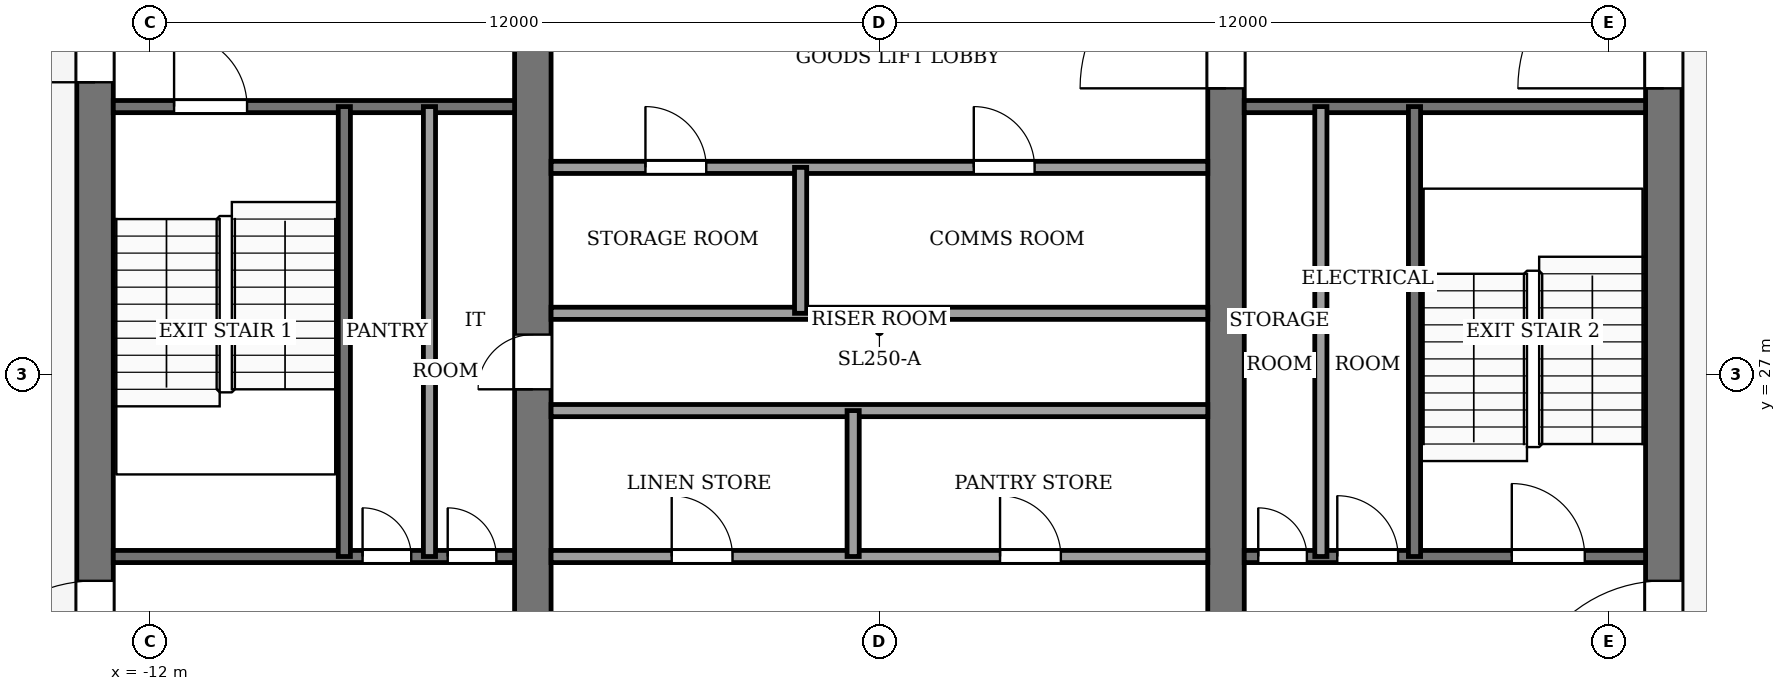
"""IFC4 building model, lengths in metres.
Left out: names, types, materials, properties, quantities, classifications, styles, units other than length and angle.
Written with IfcOpenShell. Run it as: python <this file> out.ifc"""

import sys

from ifc_helpers import new_model, si_unit, direction, frame, frame_2d, origin, place, context, subcontext, project, spatial, rectangle, extrude, element, fill, save


model = new_model("IFC4")
c1 = context("Model", 3, precision=1e-05, world=origin(), true_north=direction((0.0, 1.0)))
c2 = subcontext(c1, "Body", "Model", "MODEL_VIEW")
j1 = project(units=[si_unit("LENGTHUNIT", "METRE"), si_unit("PLANEANGLEUNIT", "RADIAN")], contexts=[c1])
p1 = place(None, origin())
s1 = spatial("IfcSite", under=j1, at=p1, CompositionType="ELEMENT")
p2 = place(p1, origin())
s2 = spatial("IfcBuilding", under=s1, at=p2, CompositionType="ELEMENT")
p3 = place(p2, frame((0.0, 0.0, 326.0)))
s3 = spatial("IfcBuildingStorey", under=s2, at=p3, CompositionType="ELEMENT", Elevation=326.0)
p4 = place(p3, frame((-12.9, 18.4, -0.13), z_axis=(0.0, 0.0, 1.0), x_axis=(0.0, 1.0, 0.0)))
e1 = element("IfcWall", 1, at=p4, inside=s3, PredefinedType="SHEAR", context=c2, shape_type="SweptSolid", body=[
    extrude(rectangle(XDim=19.2, YDim=0.6, at=frame_2d((9.6, 0.0))), origin(), (0.0, 0.0, 1.0), 4.0),
])
p5 = place(p4, frame((2.8, 0.0, 0.13)))
e2 = element("IfcOpeningElement", 2, at=p5, cuts=e1, PredefinedType="OPENING", context=c2, shape_type="SweptSolid", body=[
    extrude(rectangle(XDim=2.4, YDim=2.4, at=frame_2d((1.2, 1.2))), frame((0.0, 0.31, 0.0), z_axis=(0.0, -1.0, 0.0), x_axis=(1.0, 0.0, 0.0)), (0.0, 0.0, 1.0), 0.62),
])
p6 = place(p4, frame((13.4, 0.0, 0.13)))
e3 = element("IfcOpeningElement", 3, at=p6, cuts=e1, PredefinedType="OPENING", context=c2, shape_type="SweptSolid", body=[
    extrude(rectangle(XDim=1.4, YDim=2.2, at=frame_2d((0.7, 1.1))), frame((0.0, 0.31, 0.0), z_axis=(0.0, -1.0, 0.0), x_axis=(1.0, 0.0, 0.0)), (0.0, 0.0, 1.0), 0.62),
])
p7 = place(p3, frame((12.9, 18.4, -0.13), z_axis=(0.0, 0.0, 1.0), x_axis=(0.0, 1.0, 0.0)))
e4 = element("IfcWall", 4, at=p7, inside=s3, PredefinedType="SHEAR", context=c2, shape_type="SweptSolid", body=[
    extrude(rectangle(XDim=19.2, YDim=0.6, at=frame_2d((9.6, 0.0))), origin(), (0.0, 0.0, 1.0), 4.0),
])
p8 = place(p7, frame((2.8, 0.0, 0.13)))
e5 = element("IfcOpeningElement", 5, at=p8, cuts=e4, PredefinedType="OPENING", context=c2, shape_type="SweptSolid", body=[
    extrude(rectangle(XDim=2.4, YDim=2.4, at=frame_2d((1.2, 1.2))), frame((0.0, 0.31, 0.0), z_axis=(0.0, -1.0, 0.0), x_axis=(1.0, 0.0, 0.0)), (0.0, 0.0, 1.0), 0.62),
])
p9 = place(p7, frame((13.3, 0.0, 0.13)))
e6 = element("IfcOpeningElement", 6, at=p9, cuts=e4, PredefinedType="OPENING", context=c2, shape_type="SweptSolid", body=[
    extrude(rectangle(XDim=2.4, YDim=2.4, at=frame_2d((1.2, 1.2))), frame((0.0, 0.31, 0.0), z_axis=(0.0, -1.0, 0.0), x_axis=(1.0, 0.0, 0.0)), (0.0, 0.0, 1.0), 0.62),
])
p10 = place(p3, frame((-5.7, 18.4, -0.13), z_axis=(0.0, 0.0, 1.0), x_axis=(0.0, 1.0, 0.0)))
e7 = element("IfcWall", 7, at=p10, inside=s3, PredefinedType="SHEAR", context=c2, shape_type="SweptSolid", body=[
    extrude(rectangle(XDim=19.2, YDim=0.6, at=frame_2d((9.6, 0.0))), origin(), (0.0, 0.0, 1.0), 4.0),
])
p11 = place(p10, frame((8.35, 0.0, 0.13)))
e8 = element("IfcOpeningElement", 8, at=p11, cuts=e7, PredefinedType="OPENING", context=c2, shape_type="SweptSolid", body=[
    extrude(rectangle(XDim=0.9, YDim=2.1, at=frame_2d((0.45, 1.05))), frame((0.0, 0.31, 0.0), z_axis=(0.0, -1.0, 0.0), x_axis=(1.0, 0.0, 0.0)), (0.0, 0.0, 1.0), 0.62),
])
p12 = place(p3, frame((5.7, 18.4, -0.13), z_axis=(0.0, 0.0, 1.0), x_axis=(0.0, 1.0, 0.0)))
e9 = element("IfcWall", 9, at=p12, inside=s3, PredefinedType="SHEAR", context=c2, shape_type="SweptSolid", body=[
    extrude(rectangle(XDim=19.2, YDim=0.6, at=frame_2d((9.6, 0.0))), origin(), (0.0, 0.0, 1.0), 4.0),
])
p13 = place(p12, frame((13.3, 0.0, 0.13)))
e10 = element("IfcOpeningElement", 10, at=p13, cuts=e9, PredefinedType="OPENING", context=c2, shape_type="SweptSolid", body=[
    extrude(rectangle(XDim=2.4, YDim=2.4, at=frame_2d((1.2, 1.2))), frame((0.0, 0.31, 0.0), z_axis=(0.0, -1.0, 0.0), x_axis=(1.0, 0.0, 0.0)), (0.0, 0.0, 1.0), 0.62),
])
p14 = place(p3, frame((-12.6, 24.0, 0.0), z_axis=(0.0, 0.0, 1.0), x_axis=(1.0, 0.0, 0.0)))
e11 = element("IfcWall", 11, at=p14, inside=s3, PredefinedType="PARTITIONING", context=c2, shape_type="SweptSolid", body=[
    extrude(rectangle(XDim=6.6, YDim=0.2, at=frame_2d((3.3, 0.0))), origin(), (0.0, 0.0, 1.0), 3.87),
])
p15 = place(p14, frame((4.1, 0.0, 0.0)))
e12 = element("IfcOpeningElement", 12, at=p15, cuts=e11, PredefinedType="OPENING", context=c2, shape_type="SweptSolid", body=[
    extrude(rectangle(XDim=0.8, YDim=2.1, at=frame_2d((0.4, 1.05))), frame((0.0, 0.11, 0.0), z_axis=(0.0, -1.0, 0.0), x_axis=(1.0, 0.0, 0.0)), (0.0, 0.0, 1.0), 0.22),
])
p16 = place(p14, frame((5.5, 0.0, 0.0)))
e13 = element("IfcOpeningElement", 13, at=p16, cuts=e11, PredefinedType="OPENING", context=c2, shape_type="SweptSolid", body=[
    extrude(rectangle(XDim=0.8, YDim=2.1, at=frame_2d((0.4, 1.05))), frame((0.0, 0.11, 0.0), z_axis=(0.0, -1.0, 0.0), x_axis=(1.0, 0.0, 0.0)), (0.0, 0.0, 1.0), 0.22),
])
p17 = place(p3, frame((-5.4, 24.0, 0.0), z_axis=(0.0, 0.0, 1.0), x_axis=(1.0, 0.0, 0.0)))
e14 = element("IfcWall", 14, at=p17, inside=s3, PredefinedType="PARTITIONING", context=c2, shape_type="SweptSolid", body=[
    extrude(rectangle(XDim=10.8, YDim=0.2, at=frame_2d((5.4, 0.0))), origin(), (0.0, 0.0, 1.0), 3.87),
])
p18 = place(p17, frame((1.984, 0.0, 0.0)))
e15 = element("IfcOpeningElement", 15, at=p18, cuts=e14, PredefinedType="OPENING", context=c2, shape_type="SweptSolid", body=[
    extrude(rectangle(XDim=1.0, YDim=2.1, at=frame_2d((0.5, 1.05))), frame((0.0, 0.11, 0.0), z_axis=(0.0, -1.0, 0.0), x_axis=(1.0, 0.0, 0.0)), (0.0, 0.0, 1.0), 0.22),
])
p19 = place(p17, frame((7.384, 0.0, 0.0)))
e16 = element("IfcOpeningElement", 16, at=p19, cuts=e14, PredefinedType="OPENING", context=c2, shape_type="SweptSolid", body=[
    extrude(rectangle(XDim=1.0, YDim=2.1, at=frame_2d((0.5, 1.05))), frame((0.0, 0.11, 0.0), z_axis=(0.0, -1.0, 0.0), x_axis=(1.0, 0.0, 0.0)), (0.0, 0.0, 1.0), 0.22),
])
p20 = place(p3, frame((6.0, 24.0, 0.0), z_axis=(0.0, 0.0, 1.0), x_axis=(1.0, 0.0, 0.0)))
e17 = element("IfcWall", 17, at=p20, inside=s3, PredefinedType="PARTITIONING", context=c2, shape_type="SweptSolid", body=[
    extrude(rectangle(XDim=6.6, YDim=0.2, at=frame_2d((3.3, 0.0))), origin(), (0.0, 0.0, 1.0), 3.87),
])
p21 = place(p20, frame((0.23, 0.0, 0.0)))
e18 = element("IfcOpeningElement", 18, at=p21, cuts=e17, PredefinedType="OPENING", context=c2, shape_type="SweptSolid", body=[
    extrude(rectangle(XDim=0.8, YDim=2.1, at=frame_2d((0.4, 1.05))), frame((0.0, 0.11, 0.0), z_axis=(0.0, -1.0, 0.0), x_axis=(1.0, 0.0, 0.0)), (0.0, 0.0, 1.0), 0.22),
])
p22 = place(p20, frame((1.53, 0.0, 0.0)))
e19 = element("IfcOpeningElement", 19, at=p22, cuts=e17, PredefinedType="OPENING", context=c2, shape_type="SweptSolid", body=[
    extrude(rectangle(XDim=1.0, YDim=2.1, at=frame_2d((0.5, 1.05))), frame((0.0, 0.11, 0.0), z_axis=(0.0, -1.0, 0.0), x_axis=(1.0, 0.0, 0.0)), (0.0, 0.0, 1.0), 0.22),
])
p23 = place(p20, frame((4.4, 0.0, 0.0)))
e20 = element("IfcOpeningElement", 20, at=p23, cuts=e17, PredefinedType="OPENING", context=c2, shape_type="SweptSolid", body=[
    extrude(rectangle(XDim=1.2, YDim=2.2, at=frame_2d((0.6, 1.1))), frame((0.0, 0.11, 0.0), z_axis=(0.0, -1.0, 0.0), x_axis=(1.0, 0.0, 0.0)), (0.0, 0.0, 1.0), 0.22),
])
for number, where, z_axis, x_axis in (
    (21, (-5.4, 26.4, 0.0), (0.0, 0.0, 1.0), (1.0, 0.0, 0.0)),
    (22, (-5.4, 28.0, 0.0), (0.0, 0.0, 1.0), (1.0, 0.0, 0.0)),
):
    element("IfcWall", number, at=place(p3, frame(where, z_axis=z_axis, x_axis=x_axis)), inside=s3, PredefinedType="PARTITIONING", context=c2, shape_type="SweptSolid", body=[
        extrude(rectangle(XDim=10.8, YDim=0.2, at=frame_2d((5.4, 0.0))), origin(), (0.0, 0.0, 1.0), 3.87),
    ])
p24 = place(p3, frame((-5.4, 30.4, 0.0), z_axis=(0.0, 0.0, 1.0), x_axis=(1.0, 0.0, 0.0)))
e23 = element("IfcWall", 23, at=p24, inside=s3, PredefinedType="PARTITIONING", context=c2, shape_type="SweptSolid", body=[
    extrude(rectangle(XDim=10.8, YDim=0.2, at=frame_2d((5.4, 0.0))), origin(), (0.0, 0.0, 1.0), 3.87),
])
p25 = place(p24, frame((1.552, 0.0, 0.0)))
e24 = element("IfcOpeningElement", 24, at=p25, cuts=e23, PredefinedType="OPENING", context=c2, shape_type="SweptSolid", body=[
    extrude(rectangle(XDim=1.0, YDim=2.1, at=frame_2d((0.5, 1.05))), frame((0.0, 0.11, 0.0), z_axis=(0.0, -1.0, 0.0), x_axis=(1.0, 0.0, 0.0)), (0.0, 0.0, 1.0), 0.22),
])
p26 = place(p24, frame((6.952, 0.0, 0.0)))
e25 = element("IfcOpeningElement", 25, at=p26, cuts=e23, PredefinedType="OPENING", context=c2, shape_type="SweptSolid", body=[
    extrude(rectangle(XDim=1.0, YDim=2.1, at=frame_2d((0.5, 1.05))), frame((0.0, 0.11, 0.0), z_axis=(0.0, -1.0, 0.0), x_axis=(1.0, 0.0, 0.0)), (0.0, 0.0, 1.0), 0.22),
])
p27 = place(p3, frame((-12.6, 31.4, 0.0), z_axis=(0.0, 0.0, 1.0), x_axis=(1.0, 0.0, 0.0)))
e26 = element("IfcWall", 26, at=p27, inside=s3, PredefinedType="PARTITIONING", context=c2, shape_type="SweptSolid", body=[
    extrude(rectangle(XDim=6.6, YDim=0.2, at=frame_2d((3.3, 0.0))), origin(), (0.0, 0.0, 1.0), 3.87),
])
p28 = place(p27, frame((1.0, 0.0, 0.0)))
e27 = element("IfcOpeningElement", 27, at=p28, cuts=e26, PredefinedType="OPENING", context=c2, shape_type="SweptSolid", body=[
    extrude(rectangle(XDim=1.2, YDim=2.2, at=frame_2d((0.6, 1.1))), frame((0.0, 0.11, 0.0), z_axis=(0.0, -1.0, 0.0), x_axis=(1.0, 0.0, 0.0)), (0.0, 0.0, 1.0), 0.22),
])
p29 = place(p3, frame((6.0, 31.4, 0.0), z_axis=(0.0, 0.0, 1.0), x_axis=(1.0, 0.0, 0.0)))
e28 = element("IfcWall", 28, at=p29, inside=s3, PredefinedType="PARTITIONING", context=c2, shape_type="SweptSolid", body=[
    extrude(rectangle(XDim=6.6, YDim=0.2, at=frame_2d((3.3, 0.0))), origin(), (0.0, 0.0, 1.0), 3.87),
])
for number, where, z_axis, x_axis in (
    (29, (-8.8, 24.0, 0.0), (0.0, 0.0, 1.0), (0.0, 1.0, 0.0)),
    (30, (-7.4, 24.0, 0.0), (0.0, 0.0, 1.0), (0.0, 1.0, 0.0)),
):
    element("IfcWall", number, at=place(p3, frame(where, z_axis=z_axis, x_axis=x_axis)), inside=s3, PredefinedType="PARTITIONING", context=c2, shape_type="SweptSolid", body=[
        extrude(rectangle(XDim=7.4, YDim=0.2, at=frame_2d((3.7, 0.0))), origin(), (0.0, 0.0, 1.0), 3.87),
    ])
for number, where, z_axis, x_axis in (
    (31, (-1.296, 28.0, 0.0), (0.0, 0.0, 1.0), (0.0, 1.0, 0.0)),
    (32, (-0.432, 24.0, 0.0), (0.0, 0.0, 1.0), (0.0, 1.0, 0.0)),
):
    element("IfcWall", number, at=place(p3, frame(where, z_axis=z_axis, x_axis=x_axis)), inside=s3, PredefinedType="PARTITIONING", context=c2, shape_type="SweptSolid", body=[
        extrude(rectangle(XDim=2.4, YDim=0.2, at=frame_2d((1.2, 0.0))), origin(), (0.0, 0.0, 1.0), 3.87),
    ])
for number, where, z_axis, x_axis in (
    (33, (7.26, 24.0, 0.0), (0.0, 0.0, 1.0), (0.0, 1.0, 0.0)),
    (34, (8.8, 24.0, 0.0), (0.0, 0.0, 1.0), (0.0, 1.0, 0.0)),
):
    element("IfcWall", number, at=place(p3, frame(where, z_axis=z_axis, x_axis=x_axis)), inside=s3, PredefinedType="PARTITIONING", context=c2, shape_type="SweptSolid", body=[
        extrude(rectangle(XDim=7.4, YDim=0.2, at=frame_2d((3.7, 0.0))), origin(), (0.0, 0.0, 1.0), 3.87),
    ])
p30 = place(p18, origin())
e35 = element("IfcDoor", 35, at=p30, inside=s3, OperationType="SINGLE_SWING_LEFT", PredefinedType="DOOR", context=c2, shape_type="SweptSolid", body=[
    extrude(rectangle(XDim=1.0, YDim=2.1, at=frame_2d((0.5, 1.05))), frame((0.0, 0.025, 0.0), z_axis=(0.0, -1.0, 0.0), x_axis=(1.0, 0.0, 0.0)), (0.0, 0.0, 1.0), 0.05),
])
fill(e15, e35)
p31 = place(p19, origin())
e36 = element("IfcDoor", 36, at=p31, inside=s3, OperationType="SINGLE_SWING_RIGHT", PredefinedType="DOOR", context=c2, shape_type="SweptSolid", body=[
    extrude(rectangle(XDim=1.0, YDim=2.1, at=frame_2d((0.5, 1.05))), frame((0.0, 0.025, 0.0), z_axis=(0.0, -1.0, 0.0), x_axis=(1.0, 0.0, 0.0)), (0.0, 0.0, 1.0), 0.05),
])
fill(e16, e36)
p32 = place(p25, origin())
e37 = element("IfcDoor", 37, at=p32, inside=s3, OperationType="SINGLE_SWING_LEFT", PredefinedType="DOOR", context=c2, shape_type="SweptSolid", body=[
    extrude(rectangle(XDim=1.0, YDim=2.1, at=frame_2d((0.5, 1.05))), frame((0.0, 0.025, 0.0), z_axis=(0.0, -1.0, 0.0), x_axis=(1.0, 0.0, 0.0)), (0.0, 0.0, 1.0), 0.05),
])
fill(e24, e37)
p33 = place(p26, origin())
e38 = element("IfcDoor", 38, at=p33, inside=s3, OperationType="SINGLE_SWING_RIGHT", PredefinedType="DOOR", context=c2, shape_type="SweptSolid", body=[
    extrude(rectangle(XDim=1.0, YDim=2.1, at=frame_2d((0.5, 1.05))), frame((0.0, 0.025, 0.0), z_axis=(0.0, -1.0, 0.0), x_axis=(1.0, 0.0, 0.0)), (0.0, 0.0, 1.0), 0.05),
])
fill(e25, e38)
p34 = place(p15, origin())
e39 = element("IfcDoor", 39, at=p34, inside=s3, OperationType="SINGLE_SWING_LEFT", PredefinedType="DOOR", context=c2, shape_type="SweptSolid", body=[
    extrude(rectangle(XDim=0.8, YDim=2.1, at=frame_2d((0.4, 1.05))), frame((0.0, 0.025, 0.0), z_axis=(0.0, -1.0, 0.0), x_axis=(1.0, 0.0, 0.0)), (0.0, 0.0, 1.0), 0.05),
])
fill(e12, e39)
p35 = place(p16, origin())
e40 = element("IfcDoor", 40, at=p35, inside=s3, OperationType="SINGLE_SWING_RIGHT", PredefinedType="DOOR", context=c2, shape_type="SweptSolid", body=[
    extrude(rectangle(XDim=0.8, YDim=2.1, at=frame_2d((0.4, 1.05))), frame((0.0, 0.025, 0.0), z_axis=(0.0, -1.0, 0.0), x_axis=(1.0, 0.0, 0.0)), (0.0, 0.0, 1.0), 0.05),
])
fill(e13, e40)
p36 = place(p21, origin())
e41 = element("IfcDoor", 41, at=p36, inside=s3, OperationType="SINGLE_SWING_RIGHT", PredefinedType="DOOR", context=c2, shape_type="SweptSolid", body=[
    extrude(rectangle(XDim=0.8, YDim=2.1, at=frame_2d((0.4, 1.05))), frame((0.0, 0.025, 0.0), z_axis=(0.0, -1.0, 0.0), x_axis=(1.0, 0.0, 0.0)), (0.0, 0.0, 1.0), 0.05),
])
fill(e18, e41)
p37 = place(p22, origin())
e42 = element("IfcDoor", 42, at=p37, inside=s3, OperationType="SINGLE_SWING_LEFT", PredefinedType="DOOR", context=c2, shape_type="SweptSolid", body=[
    extrude(rectangle(XDim=1.0, YDim=2.1, at=frame_2d((0.5, 1.05))), frame((0.0, 0.025, 0.0), z_axis=(0.0, -1.0, 0.0), x_axis=(1.0, 0.0, 0.0)), (0.0, 0.0, 1.0), 0.05),
])
fill(e19, e42)
p38 = place(p11, origin())
e43 = element("IfcDoor", 43, at=p38, inside=s3, OperationType="SINGLE_SWING_RIGHT", PredefinedType="DOOR", context=c2, shape_type="SweptSolid", body=[
    extrude(rectangle(XDim=0.9, YDim=2.1, at=frame_2d((0.45, 1.05))), frame((0.0, 0.025, 0.0), z_axis=(0.0, -1.0, 0.0), x_axis=(1.0, 0.0, 0.0)), (0.0, 0.0, 1.0), 0.05),
])
fill(e8, e43)
p39 = place(p28, origin())
e44 = element("IfcDoor", 44, at=p39, inside=s3, OperationType="SINGLE_SWING_RIGHT", PredefinedType="DOOR", context=c2, shape_type="SweptSolid", body=[
    extrude(rectangle(XDim=1.2, YDim=2.2, at=frame_2d((0.6, 1.1))), frame((0.0, 0.025, 0.0), z_axis=(0.0, -1.0, 0.0), x_axis=(1.0, 0.0, 0.0)), (0.0, 0.0, 1.0), 0.05),
])
fill(e27, e44)
p40 = place(p23, origin())
e45 = element("IfcDoor", 45, at=p40, inside=s3, OperationType="SINGLE_SWING_LEFT", PredefinedType="DOOR", context=c2, shape_type="SweptSolid", body=[
    extrude(rectangle(XDim=1.2, YDim=2.2, at=frame_2d((0.6, 1.1))), frame((0.0, 0.025, 0.0), z_axis=(0.0, -1.0, 0.0), x_axis=(1.0, 0.0, 0.0)), (0.0, 0.0, 1.0), 0.05),
])
fill(e20, e45)
p41 = place(p13, origin())
e46 = element("IfcDoor", 46, at=p41, inside=s3, OperationType="DOUBLE_DOOR_SINGLE_SWING", PredefinedType="DOOR", context=c2, shape_type="SweptSolid", body=[
    extrude(rectangle(XDim=2.4, YDim=2.4, at=frame_2d((1.2, 1.2))), frame((0.0, 0.025, 0.0), z_axis=(0.0, -1.0, 0.0), x_axis=(1.0, 0.0, 0.0)), (0.0, 0.0, 1.0), 0.05),
])
fill(e10, e46)
p42 = place(p5, origin())
e47 = element("IfcDoor", 47, at=p42, inside=s3, OperationType="DOUBLE_DOOR_SINGLE_SWING", PredefinedType="DOOR", context=c2, shape_type="SweptSolid", body=[
    extrude(rectangle(XDim=2.4, YDim=2.4, at=frame_2d((1.2, 1.2))), frame((0.0, 0.025, 0.0), z_axis=(0.0, -1.0, 0.0), x_axis=(1.0, 0.0, 0.0)), (0.0, 0.0, 1.0), 0.05),
])
fill(e2, e47)
p43 = place(p8, origin())
e48 = element("IfcDoor", 48, at=p43, inside=s3, OperationType="DOUBLE_DOOR_SINGLE_SWING", PredefinedType="DOOR", context=c2, shape_type="SweptSolid", body=[
    extrude(rectangle(XDim=2.4, YDim=2.4, at=frame_2d((1.2, 1.2))), frame((0.0, 0.025, 0.0), z_axis=(0.0, -1.0, 0.0), x_axis=(1.0, 0.0, 0.0)), (0.0, 0.0, 1.0), 0.05),
])
fill(e5, e48)
p44 = place(p9, origin())
e49 = element("IfcDoor", 49, at=p44, inside=s3, OperationType="DOUBLE_DOOR_SINGLE_SWING", PredefinedType="DOOR", context=c2, shape_type="SweptSolid", body=[
    extrude(rectangle(XDim=2.4, YDim=2.4, at=frame_2d((1.2, 1.2))), frame((0.0, 0.025, 0.0), z_axis=(0.0, -1.0, 0.0), x_axis=(1.0, 0.0, 0.0)), (0.0, 0.0, 1.0), 0.05),
])
fill(e6, e49)
p45 = place(p6, origin())
e50 = element("IfcDoor", 50, at=p45, inside=s3, OperationType="SINGLE_SWING_RIGHT", PredefinedType="DOOR", context=c2, shape_type="SweptSolid", body=[
    extrude(rectangle(XDim=1.4, YDim=2.2, at=frame_2d((0.7, 1.1))), frame((0.0, 0.025, 0.0), z_axis=(0.0, -1.0, 0.0), x_axis=(1.0, 0.0, 0.0)), (0.0, 0.0, 1.0), 0.05),
])
fill(e3, e50)
save(model, sys.argv[1])
